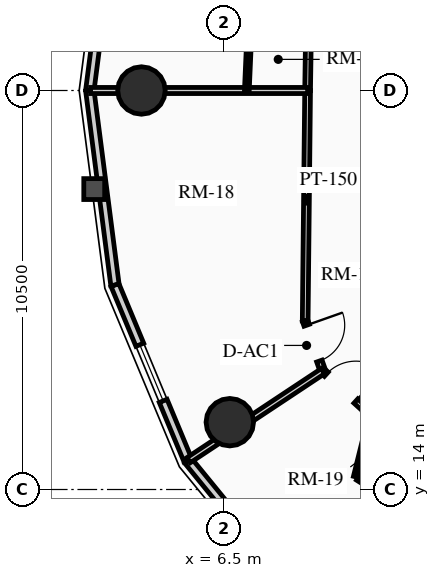
"""IFC4 building model, lengths in metres.
Left out: names, types, materials, properties, quantities, classifications, styles, units other than length and angle.
Written with IfcOpenShell. Run it as: python <this file> out.ifc"""

import sys

from ifc_helpers import new_model, si_unit, direction, frame, frame_2d, origin, origin_2d, place, context, subcontext, project, spatial, rectangle, circle, extrude, source, transform, mapped, element, fill, save


model = new_model("IFC4")
c1 = context("Model", 3, precision=1e-05, world=origin(), true_north=direction((0.0, 1.0)))
c2 = subcontext(c1, "Body", "Model", "MODEL_VIEW")
j1 = project(units=[si_unit("LENGTHUNIT", "METRE"), si_unit("PLANEANGLEUNIT", "RADIAN")], contexts=[c1])
p1 = place(None, origin())
s1 = spatial("IfcSite", under=j1, at=p1, CompositionType="ELEMENT")
p2 = place(p1, origin())
s2 = spatial("IfcBuilding", under=s1, at=p2, CompositionType="ELEMENT")
p3 = place(p2, frame((0.0, 0.0, 180.7)))
s3 = spatial("IfcBuildingStorey", under=s2, at=p3, CompositionType="ELEMENT", Elevation=180.7)
for number, where, z_axis, x_axis in (
    (1, (4.328, 24.5, 0.0), (0.0, 0.0, 1.0), (1.0, 0.0, 0.0)),
    (2, (6.653, 15.771, 0.0), (0.0, 0.0, 1.0), (1.0, 0.0, 0.0)),
):
    element("IfcColumn", number, at=place(p3, frame(where, z_axis=z_axis, x_axis=x_axis)), inside=s3, PredefinedType="USERDEFINED", context=c2, shape_type="SweptSolid", body=[
        extrude(circle(Radius=0.625, at=origin_2d()), origin(), (0.0, 0.0, 1.0), 2.91),
    ])
p4 = place(p3, frame((2.969, 24.5, 0.0), z_axis=(0.0, 0.0, 1.0), x_axis=(0.128287912609, 0.991736966881, 0.0)))
e3 = element("IfcWall", 3, at=p4, inside=s3, PredefinedType="SOLIDWALL", context=c2, shape_type="SweptSolid", body=[
    extrude(rectangle(XDim=5.163, YDim=0.22, at=frame_2d((2.582, 0.0))), origin(), (0.0, 0.0, 1.0), 2.245),
])
m1 = source(origin(), c2, "Body", "SweptSolid", [
    extrude(rectangle(XDim=1.6, YDim=1.3, at=frame_2d((0.8, 0.65))), frame((0.0, 0.12, 0.0), z_axis=(0.0, -1.0, 0.0), x_axis=(1.0, 0.0, 0.0)), (0.0, 0.0, 1.0), 0.24),
])
p5 = place(p4, frame((1.782, 0.0, 0.65)))
e4 = element("IfcOpeningElement", 4, at=p5, cuts=e3, PredefinedType="OPENING", context=c2, shape_type="MappedRepresentation", body=[
    mapped(m1, transform((0.0, 0.0, 0.0), x_axis=(1.0, 0.0, 0.0), y_axis=(0.0, 1.0, 0.0), z_axis=(0.0, 0.0, 1.0), scale=1.0)),
])
p6 = place(p3, frame((3.631, 19.38, 0.0), z_axis=(0.0, 0.0, 1.0), x_axis=(-0.128287912609, 0.991736966881, 0.0)))
e5 = element("IfcWall", 5, at=p6, inside=s3, PredefinedType="SOLIDWALL", context=c2, shape_type="SweptSolid", body=[
    extrude(rectangle(XDim=5.163, YDim=0.22, at=frame_2d((2.582, 0.0))), origin(), (0.0, 0.0, 1.0), 2.245),
])
p7 = place(p3, frame((5.553, 14.76, 0.0), z_axis=(0.0, 0.0, 1.0), x_axis=(-0.384144094086, 0.923273152961, 0.0)))
e6 = element("IfcWall", 6, at=p7, inside=s3, PredefinedType="SOLIDWALL", context=c2, shape_type="SweptSolid", body=[
    extrude(rectangle(XDim=5.003, YDim=0.22, at=frame_2d((2.501, 0.0))), origin(), (0.0, 0.0, 1.0), 2.245),
])
p8 = place(p7, frame((1.702, 0.0, 0.65)))
e7 = element("IfcOpeningElement", 7, at=p8, cuts=e6, PredefinedType="OPENING", context=c2, shape_type="MappedRepresentation", body=[
    mapped(m1, transform((0.0, 0.0, 0.0), x_axis=(1.0, 0.0, 0.0), y_axis=(0.0, 1.0, 0.0), z_axis=(0.0, 0.0, 1.0), scale=1.0)),
])
p9 = place(p3, frame((8.547, 11.094, 0.0), z_axis=(0.0, 0.0, 1.0), x_axis=(-0.632470615287, 0.774584353572, 0.0)))
e8 = element("IfcWall", 8, at=p9, inside=s3, PredefinedType="SOLIDWALL", context=c2, shape_type="SweptSolid", body=[
    extrude(rectangle(XDim=4.733, YDim=0.22, at=frame_2d((2.366, 0.0))), origin(), (0.0, 0.0, 1.0), 2.245),
])
p10 = place(p3, frame((8.791, 30.446, 0.0), z_axis=(0.0, 0.0, 1.0), x_axis=(-0.015230619426, -0.999884007389, 0.0)))
e9 = element("IfcWall", 9, at=p10, inside=s3, PredefinedType="PARTITIONING", context=c2, shape_type="SweptSolid", body=[
    extrude(rectangle(XDim=5.947, YDim=0.15, at=frame_2d((2.974, 0.0))), origin(), (0.0, 0.0, 1.0), 2.675),
])
p11 = place(p3, frame((8.7, 24.5, 0.0), z_axis=(0.0, 0.0, 1.0), x_axis=(-0.010507512335, -0.999944794568, 0.0)))
e10 = element("IfcWall", 10, at=p11, inside=s3, PredefinedType="PARTITIONING", context=c2, shape_type="SweptSolid", body=[
    extrude(rectangle(XDim=6.064, YDim=0.15, at=frame_2d((3.032, 0.0))), origin(), (0.0, 0.0, 1.0), 2.245),
])
p12 = place(p3, frame((8.636, 18.436, 0.0), z_axis=(0.0, 0.0, 1.0), x_axis=(0.333211866524, -0.942851977782, 0.0)))
e11 = element("IfcWall", 11, at=p12, inside=s3, PredefinedType="PARTITIONING", context=c2, shape_type="SweptSolid", body=[
    extrude(rectangle(XDim=1.402, YDim=0.15, at=frame_2d((0.701, 0.0))), origin(), (0.0, 0.0, 1.0), 2.245),
])
m2 = source(origin(), c2, "Body", "SweptSolid", [
    extrude(rectangle(XDim=1.0, YDim=2.015, at=frame_2d((0.5, 1.007))), frame((0.0, 0.085, 0.0), z_axis=(0.0, -1.0, 0.0), x_axis=(1.0, 0.0, 0.0)), (0.0, 0.0, 1.0), 0.17),
])
p13 = place(p12, frame((0.12, 0.0, 0.0)))
e12 = element("IfcOpeningElement", 12, at=p13, cuts=e11, PredefinedType="OPENING", context=c2, shape_type="MappedRepresentation", body=[
    mapped(m2, transform((0.0, 0.0, 0.0), x_axis=(1.0, 0.0, 0.0), y_axis=(0.0, 1.0, 0.0), z_axis=(0.0, 0.0, 1.0), scale=1.0)),
])
p14 = place(p3, frame((9.103, 17.115, 0.0), z_axis=(0.0, 0.0, 1.0), x_axis=(0.740186897911, -0.672401186912, 0.0)))
e13 = element("IfcWall", 13, at=p14, inside=s3, PredefinedType="PARTITIONING", context=c2, shape_type="SweptSolid", body=[
    extrude(rectangle(XDim=1.477, YDim=0.15, at=frame_2d((0.738, 0.0))), origin(), (0.0, 0.0, 1.0), 2.245),
])
m3 = source(origin(), c2, "Body", "SweptSolid", [
    extrude(rectangle(XDim=1.05, YDim=2.015, at=frame_2d((0.525, 1.007))), frame((0.0, 0.085, 0.0), z_axis=(0.0, -1.0, 0.0), x_axis=(1.0, 0.0, 0.0)), (0.0, 0.0, 1.0), 0.17),
])
p15 = place(p14, frame((0.12, 0.0, 0.0)))
e14 = element("IfcOpeningElement", 14, at=p15, cuts=e13, PredefinedType="OPENING", context=c2, shape_type="MappedRepresentation", body=[
    mapped(m3, transform((0.0, 0.0, 0.0), x_axis=(1.0, 0.0, 0.0), y_axis=(0.0, 1.0, 0.0), z_axis=(0.0, 0.0, 1.0), scale=1.0)),
])
p16 = place(p3, frame((8.7, 24.5, 0.0), z_axis=(0.0, 0.0, 1.0), x_axis=(-1.0, 0.0, 0.0)))
e15 = element("IfcWall", 15, at=p16, inside=s3, PredefinedType="PARTITIONING", context=c2, shape_type="SweptSolid", body=[
    extrude(rectangle(XDim=5.711, YDim=0.16, at=frame_2d((2.855, 0.0))), origin(), (0.0, 0.0, 1.0), 2.245),
])
p17 = place(p3, frame((9.103, 17.115, 0.0), z_axis=(0.0, 0.0, 1.0), x_axis=(-0.833535637115, -0.552465692745, 0.0)))
e16 = element("IfcWall", 16, at=p17, inside=s3, PredefinedType="PARTITIONING", context=c2, shape_type="SweptSolid", body=[
    extrude(rectangle(XDim=4.24, YDim=0.16, at=frame_2d((2.12, 0.0))), origin(), (0.0, 0.0, 1.0), 2.245),
])
p18 = place(p3, frame((7.351, 30.213, 0.0), z_axis=(0.0, 0.0, 1.0), x_axis=(-0.043800331293, -0.999040304982, 0.0)))
e17 = element("IfcWall", 17, at=p18, inside=s3, PredefinedType="PARTITIONING", context=c2, shape_type="SweptSolid", body=[
    extrude(rectangle(XDim=5.719, YDim=0.125, at=frame_2d((2.859, 0.0))), origin(), (0.0, 0.0, 1.0), 2.675),
])
p19 = place(p3, frame((10.343, 15.847, 0.0), z_axis=(0.0, 0.0, 1.0), x_axis=(-0.240988864291, -0.970527880737, 0.0)))
e18 = element("IfcWall", 18, at=p19, inside=s3, PredefinedType="PARTITIONING", context=c2, shape_type="SweptSolid", body=[
    extrude(rectangle(XDim=1.56, YDim=0.125, at=frame_2d((0.78, 0.0))), origin(), (0.0, 0.0, 1.0), 2.245),
])
p20 = place(p3, frame((10.02, 14.299, 0.0), z_axis=(0.0, 0.0, 1.0), x_axis=(0.846015763056, -0.533157883427, 0.0)))
e19 = element("IfcWall", 19, at=p20, inside=s3, PredefinedType="PARTITIONING", context=c2, shape_type="SweptSolid", body=[
    extrude(rectangle(XDim=1.991, YDim=0.125, at=frame_2d((0.996, 0.0))), origin(), (0.0, 0.0, 1.0), 2.675),
])
m4 = source(origin(), c2, "Body", "SweptSolid", [
    extrude(rectangle(XDim=0.9, YDim=2.005, at=frame_2d((0.45, 1.002))), frame((0.0, 0.073, 0.0), z_axis=(0.0, -1.0, 0.0), x_axis=(1.0, 0.0, 0.0)), (0.0, 0.0, 1.0), 0.145),
])
p21 = place(p20, frame((0.439, 0.0, 0.0)))
e20 = element("IfcOpeningElement", 20, at=p21, cuts=e19, PredefinedType="OPENING", context=c2, shape_type="MappedRepresentation", body=[
    mapped(m4, transform((0.0, 0.0, 0.0), x_axis=(1.0, 0.0, 0.0), y_axis=(0.0, 1.0, 0.0), z_axis=(0.0, 0.0, 1.0), scale=1.0)),
])
m5 = source(origin(), c2, "Body", "SweptSolid", [
    extrude(rectangle(XDim=1.6, YDim=1.3, at=frame_2d((0.8, 0.65))), frame((0.0, 0.03, 0.0), z_axis=(0.0, -1.0, 0.0), x_axis=(1.0, 0.0, 0.0)), (0.0, 0.0, 1.0), 0.06),
])
p22 = place(p8, origin())
e21 = element("IfcWindow", 21, at=p22, inside=s3, PartitioningType="SINGLE_PANEL", PredefinedType="WINDOW", context=c2, shape_type="MappedRepresentation", body=[
    mapped(m5, transform((0.0, 0.0, 0.0), x_axis=(1.0, 0.0, 0.0), y_axis=(0.0, 1.0, 0.0), z_axis=(0.0, 0.0, 1.0), scale=1.0)),
])
fill(e7, e21)
m6 = source(origin(), c2, "Body", "SweptSolid", [
    extrude(rectangle(XDim=1.0, YDim=2.015, at=frame_2d((0.5, 1.007))), frame((0.0, 0.025, 0.0), z_axis=(0.0, -1.0, 0.0), x_axis=(1.0, 0.0, 0.0)), (0.0, 0.0, 1.0), 0.05),
])
p23 = place(p13, origin())
e22 = element("IfcDoor", 22, at=p23, inside=s3, OperationType="SINGLE_SWING_LEFT", PredefinedType="DOOR", context=c2, shape_type="MappedRepresentation", body=[
    mapped(m6, transform((0.0, 0.0, 0.0), x_axis=(1.0, 0.0, 0.0), y_axis=(0.0, 1.0, 0.0), z_axis=(0.0, 0.0, 1.0), scale=1.0)),
])
fill(e12, e22)
m7 = source(origin(), c2, "Body", "SweptSolid", [
    extrude(rectangle(XDim=1.05, YDim=2.015, at=frame_2d((0.525, 1.007))), frame((0.0, 0.025, 0.0), z_axis=(0.0, -1.0, 0.0), x_axis=(1.0, 0.0, 0.0)), (0.0, 0.0, 1.0), 0.05),
])
p24 = place(p15, origin())
e23 = element("IfcDoor", 23, at=p24, inside=s3, OperationType="SINGLE_SWING_RIGHT", PredefinedType="DOOR", context=c2, shape_type="MappedRepresentation", body=[
    mapped(m7, transform((0.0, 0.0, 0.0), x_axis=(1.0, 0.0, 0.0), y_axis=(0.0, 1.0, 0.0), z_axis=(0.0, 0.0, 1.0), scale=1.0)),
])
fill(e14, e23)
save(model, sys.argv[1])
